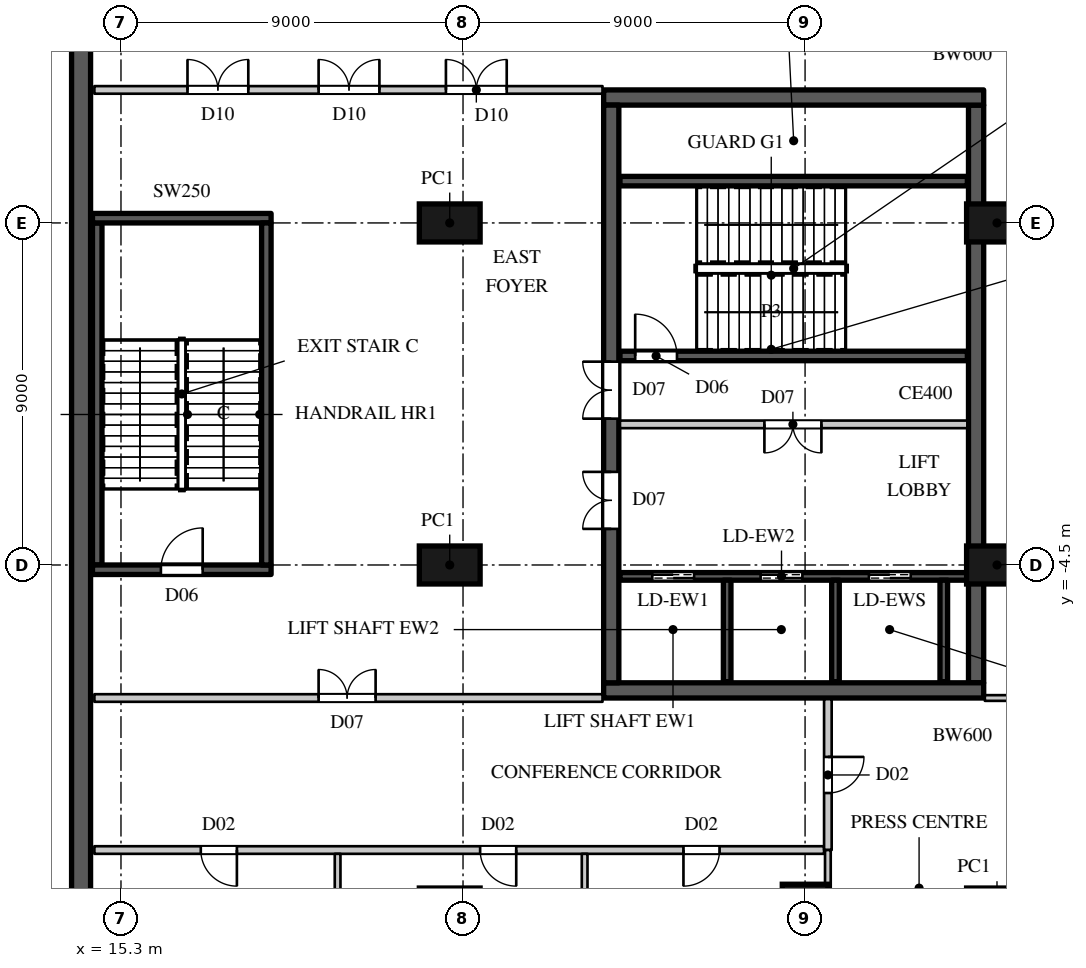
"""IFC4 building model, lengths in metres.
Left out: names, types, materials, properties, quantities, classifications, styles, units other than length and angle.
Written with IfcOpenShell. Run it as: python <this file> out.ifc"""

import sys

from ifc_helpers import new_model, si_unit, direction, frame, frame_2d, origin, origin_2d, place, context, subcontext, project, spatial, rectangle, circle, extrude, element, fill, save


model = new_model("IFC4")
c1 = context("Model", 3, precision=1e-05, world=origin(), true_north=direction((0.0, 1.0)))
c2 = subcontext(c1, "Body", "Model", "MODEL_VIEW")
j1 = project(units=[si_unit("LENGTHUNIT", "METRE"), si_unit("PLANEANGLEUNIT", "RADIAN")], contexts=[c1])
p1 = place(None, origin())
s1 = spatial("IfcSite", under=j1, at=p1, CompositionType="ELEMENT")
p2 = place(p1, origin())
s2 = spatial("IfcBuilding", under=s1, at=p2, CompositionType="ELEMENT")
p3 = place(p2, frame((0.0, 0.0, 19.0)))
s3 = spatial("IfcBuildingStorey", under=s2, at=p3, CompositionType="ELEMENT", Elevation=19.0)
p4 = place(p3, frame((14.25, -19.5, 0.0), z_axis=(0.0, 0.0, 1.0), x_axis=(0.0, 1.0, 0.0)))
e1 = element("IfcWall", 1, at=p4, inside=s3, PredefinedType="SOLIDWALL", context=c2, shape_type="SweptSolid", body=[
    extrude(rectangle(XDim=39.0, YDim=0.5, at=frame_2d((19.5, 0.0))), origin(), (0.0, 0.0, 1.0), 10.0),
])
for number, where, z_axis, x_axis in (
    (2, (23.95, -4.5, 0.0), (0.0, 0.0, 1.0), (0.0, 1.0, 0.0)),
    (3, (23.95, 4.5, 0.0), (0.0, 0.0, 1.0), (0.0, 1.0, 0.0)),
    (4, (38.35, -4.5, 0.0), (0.0, 0.0, 1.0), (0.0, 1.0, 0.0)),
    (5, (38.35, 4.5, 0.0), (0.0, 0.0, 1.0), (0.0, 1.0, 0.0)),
):
    element("IfcColumn", number, at=place(p3, frame(where, z_axis=z_axis, x_axis=x_axis)), inside=s3, PredefinedType="COLUMN", context=c2, shape_type="SweptSolid", body=[
        extrude(rectangle(XDim=1.0, YDim=1.6, at=origin_2d()), origin(), (0.0, 0.0, 1.0), 10.0),
    ])
p5 = place(p3, frame((33.3, -13.5, 0.0), z_axis=(0.0, 0.0, 1.0), x_axis=(1.0, 0.0, 0.0)))
e6 = element("IfcColumn", 6, at=p5, inside=s3, PredefinedType="COLUMN", context=c2, shape_type="SweptSolid", body=[
    extrude(circle(Radius=0.6, at=origin_2d()), origin(), (0.0, 0.0, 1.0), 10.0),
])
for number, where, z_axis, x_axis in (
    (7, (28.0, 7.8, 0.0), (0.0, 0.0, 1.0), (1.0, 0.0, 0.0)),
    (8, (28.0, -7.8, 0.0), (0.0, 0.0, 1.0), (1.0, 0.0, 0.0)),
):
    element("IfcWall", number, at=place(p3, frame(where, z_axis=z_axis, x_axis=x_axis)), inside=s3, PredefinedType="SHEAR", context=c2, shape_type="SweptSolid", body=[
        extrude(rectangle(XDim=10.0, YDim=0.4, at=frame_2d((5.0, 0.0))), origin(), (0.0, 0.0, 1.0), 10.0),
    ])
p6 = place(p3, frame((37.8, -7.6, 0.0), z_axis=(0.0, 0.0, 1.0), x_axis=(0.0, 1.0, 0.0)))
e9 = element("IfcWall", 9, at=p6, inside=s3, PredefinedType="SHEAR", context=c2, shape_type="SweptSolid", body=[
    extrude(rectangle(XDim=15.2, YDim=0.4, at=frame_2d((7.6, 0.0))), origin(), (0.0, 0.0, 1.0), 10.0),
])
p7 = place(p3, frame((28.2, -7.6, 0.0), z_axis=(0.0, 0.0, 1.0), x_axis=(0.0, 1.0, 0.0)))
e10 = element("IfcWall", 10, at=p7, inside=s3, PredefinedType="SHEAR", context=c2, shape_type="SweptSolid", body=[
    extrude(rectangle(XDim=15.2, YDim=0.4, at=frame_2d((7.6, 0.0))), origin(), (0.0, 0.0, 1.0), 10.0),
])
p8 = place(p7, frame((4.05, 0.0, 0.0)))
e11 = element("IfcOpeningElement", 11, at=p8, cuts=e10, PredefinedType="OPENING", context=c2, shape_type="SweptSolid", body=[
    extrude(rectangle(XDim=1.5, YDim=2.4, at=frame_2d((0.75, 1.2))), frame((0.0, 0.21, 0.0), z_axis=(0.0, -1.0, 0.0), x_axis=(1.0, 0.0, 0.0)), (0.0, 0.0, 1.0), 0.42),
])
p9 = place(p7, frame((6.95, 0.0, 0.0)))
e12 = element("IfcOpeningElement", 12, at=p9, cuts=e10, PredefinedType="OPENING", context=c2, shape_type="SweptSolid", body=[
    extrude(rectangle(XDim=1.5, YDim=2.4, at=frame_2d((0.75, 1.2))), frame((0.0, 0.21, 0.0), z_axis=(0.0, -1.0, 0.0), x_axis=(1.0, 0.0, 0.0)), (0.0, 0.0, 1.0), 0.42),
])
p10 = place(p3, frame((14.6, -12.0, 0.0), z_axis=(0.0, 0.0, 1.0), x_axis=(1.0, 0.0, 0.0)))
e13 = element("IfcWall", 13, at=p10, inside=s3, PredefinedType="PARTITIONING", context=c2, shape_type="SweptSolid", body=[
    extrude(rectangle(XDim=19.2, YDim=0.2, at=frame_2d((9.6, 0.0))), origin(), (0.0, 0.0, 1.0), 9.598),
])
p11 = place(p10, frame((2.8, 0.0, 0.0)))
e14 = element("IfcOpeningElement", 14, at=p11, cuts=e13, PredefinedType="OPENING", context=c2, shape_type="SweptSolid", body=[
    extrude(rectangle(XDim=0.95, YDim=2.2, at=frame_2d((0.475, 1.1))), frame((0.0, 0.11, 0.0), z_axis=(0.0, -1.0, 0.0), x_axis=(1.0, 0.0, 0.0)), (0.0, 0.0, 1.0), 0.22),
])
p12 = place(p10, frame((10.15, 0.0, 0.0)))
e15 = element("IfcOpeningElement", 15, at=p12, cuts=e13, PredefinedType="OPENING", context=c2, shape_type="SweptSolid", body=[
    extrude(rectangle(XDim=0.95, YDim=2.2, at=frame_2d((0.475, 1.1))), frame((0.0, 0.11, 0.0), z_axis=(0.0, -1.0, 0.0), x_axis=(1.0, 0.0, 0.0)), (0.0, 0.0, 1.0), 0.22),
])
p13 = place(p10, frame((15.5, 0.0, 0.0)))
e16 = element("IfcOpeningElement", 16, at=p13, cuts=e13, PredefinedType="OPENING", context=c2, shape_type="SweptSolid", body=[
    extrude(rectangle(XDim=0.95, YDim=2.2, at=frame_2d((0.475, 1.1))), frame((0.0, 0.11, 0.0), z_axis=(0.0, -1.0, 0.0), x_axis=(1.0, 0.0, 0.0)), (0.0, 0.0, 1.0), 0.22),
])
p14 = place(p3, frame((14.6, -8.0, 0.0), z_axis=(0.0, 0.0, 1.0), x_axis=(1.0, 0.0, 0.0)))
e17 = element("IfcWall", 17, at=p14, inside=s3, PredefinedType="PARTITIONING", context=c2, shape_type="SweptSolid", body=[
    extrude(rectangle(XDim=13.37, YDim=0.2, at=frame_2d((6.685, 0.0))), origin(), (0.0, 0.0, 1.0), 9.598),
])
p15 = place(p14, frame((5.9, 0.0, 0.0)))
e18 = element("IfcOpeningElement", 18, at=p15, cuts=e17, PredefinedType="OPENING", context=c2, shape_type="SweptSolid", body=[
    extrude(rectangle(XDim=1.5, YDim=2.4, at=frame_2d((0.75, 1.2))), frame((0.0, 0.11, 0.0), z_axis=(0.0, -1.0, 0.0), x_axis=(1.0, 0.0, 0.0)), (0.0, 0.0, 1.0), 0.22),
])
p16 = place(p3, frame((14.6, 8.0, 0.0), z_axis=(0.0, 0.0, 1.0), x_axis=(1.0, 0.0, 0.0)))
e19 = element("IfcWall", 19, at=p16, inside=s3, PredefinedType="PARTITIONING", context=c2, shape_type="SweptSolid", body=[
    extrude(rectangle(XDim=13.37, YDim=0.2, at=frame_2d((6.685, 0.0))), origin(), (0.0, 0.0, 1.0), 9.598),
])
p17 = place(p16, frame((5.9, 0.0, 0.0)))
e20 = element("IfcOpeningElement", 20, at=p17, cuts=e19, PredefinedType="OPENING", context=c2, shape_type="SweptSolid", body=[
    extrude(rectangle(XDim=1.6, YDim=2.4, at=frame_2d((0.8, 1.2))), frame((0.0, 0.11, 0.0), z_axis=(0.0, -1.0, 0.0), x_axis=(1.0, 0.0, 0.0)), (0.0, 0.0, 1.0), 0.22),
])
p18 = place(p16, frame((2.45, 0.0, 0.0)))
e21 = element("IfcOpeningElement", 21, at=p18, cuts=e19, PredefinedType="OPENING", context=c2, shape_type="SweptSolid", body=[
    extrude(rectangle(XDim=1.6, YDim=2.4, at=frame_2d((0.8, 1.2))), frame((0.0, 0.11, 0.0), z_axis=(0.0, -1.0, 0.0), x_axis=(1.0, 0.0, 0.0)), (0.0, 0.0, 1.0), 0.22),
])
p19 = place(p16, frame((9.25, 0.0, 0.0)))
e22 = element("IfcOpeningElement", 22, at=p19, cuts=e19, PredefinedType="OPENING", context=c2, shape_type="SweptSolid", body=[
    extrude(rectangle(XDim=1.6, YDim=2.4, at=frame_2d((0.8, 1.2))), frame((0.0, 0.11, 0.0), z_axis=(0.0, -1.0, 0.0), x_axis=(1.0, 0.0, 0.0)), (0.0, 0.0, 1.0), 0.22),
])
p20 = place(p3, frame((28.43, -0.8, 0.0), z_axis=(0.0, 0.0, 1.0), x_axis=(1.0, 0.0, 0.0)))
e23 = element("IfcWall", 23, at=p20, inside=s3, PredefinedType="PARTITIONING", context=c2, shape_type="SweptSolid", body=[
    extrude(rectangle(XDim=9.14, YDim=0.2, at=frame_2d((4.57, 0.0))), origin(), (0.0, 0.0, 1.0), 9.598),
])
p21 = place(p20, frame((3.8, 0.0, 0.0)))
e24 = element("IfcOpeningElement", 24, at=p21, cuts=e23, PredefinedType="OPENING", context=c2, shape_type="SweptSolid", body=[
    extrude(rectangle(XDim=1.5, YDim=2.4, at=frame_2d((0.75, 1.2))), frame((0.0, 0.11, 0.0), z_axis=(0.0, -1.0, 0.0), x_axis=(1.0, 0.0, 0.0)), (0.0, 0.0, 1.0), 0.22),
])
p22 = place(p3, frame((33.9, -12.0, 0.0), z_axis=(0.0, 0.0, 1.0), x_axis=(0.0, 1.0, 0.0)))
e25 = element("IfcWall", 25, at=p22, inside=s3, PredefinedType="PARTITIONING", context=c2, shape_type="SweptSolid", body=[
    extrude(rectangle(XDim=3.97, YDim=0.2, at=frame_2d((1.985, 0.0))), origin(), (0.0, 0.0, 1.0), 9.598),
])
p23 = place(p22, frame((1.5, 0.0, 0.0)))
e26 = element("IfcOpeningElement", 26, at=p23, cuts=e25, PredefinedType="OPENING", context=c2, shape_type="SweptSolid", body=[
    extrude(rectangle(XDim=0.95, YDim=2.2, at=frame_2d((0.475, 1.1))), frame((0.0, 0.11, 0.0), z_axis=(0.0, -1.0, 0.0), x_axis=(1.0, 0.0, 0.0)), (0.0, 0.0, 1.0), 0.22),
])
for number, where, z_axis, x_axis in (
    (27, (21.0, -27.125, 0.0), (0.0, 0.0, 1.0), (0.0, 1.0, 0.0)),
    (28, (27.5, -27.125, 0.0), (0.0, 0.0, 1.0), (0.0, 1.0, 0.0)),
):
    element("IfcWall", number, at=place(p3, frame(where, z_axis=z_axis, x_axis=x_axis)), inside=s3, PredefinedType="PARTITIONING", context=c2, shape_type="SweptSolid", body=[
        extrude(rectangle(XDim=15.025, YDim=0.15, at=frame_2d((7.512, 0.0))), origin(), (0.0, 0.0, 1.0), 9.598),
    ])
p24 = place(p3, frame((33.9, -13.24, 0.0), z_axis=(0.0, 0.0, 1.0), x_axis=(0.0, 1.0, 0.0)))
e29 = element("IfcWall", 29, at=p24, inside=s3, PredefinedType="PARTITIONING", context=c2, shape_type="SweptSolid", body=[
    extrude(rectangle(XDim=1.24, YDim=0.15, at=frame_2d((0.62, 0.0))), origin(), (0.0, 0.0, 1.0), 9.598),
])
p25 = place(p3, frame((38.03, -8.0, 0.0), z_axis=(0.0, 0.0, 1.0), x_axis=(1.0, 0.0, 0.0)))
e30 = element("IfcWall", 30, at=p25, inside=s3, PredefinedType="PARTITIONING", context=c2, shape_type="SweptSolid", body=[
    extrude(rectangle(XDim=0.595, YDim=0.15, at=frame_2d((0.297, 0.0))), origin(), (0.0, 0.0, 1.0), 9.598),
])
p26 = place(p3, frame((28.43, -4.8, 0.0), z_axis=(0.0, 0.0, 1.0), x_axis=(1.0, 0.0, 0.0)))
e31 = element("IfcWall", 31, at=p26, inside=s3, PredefinedType="SHEAR", context=c2, shape_type="SweptSolid", body=[
    extrude(rectangle(XDim=9.13, YDim=0.2, at=frame_2d((4.565, 0.0))), origin(), (0.0, 0.0, 1.0), 9.598),
])
p27 = place(p26, frame((0.85, 0.0, 0.0)))
e32 = element("IfcOpeningElement", 32, at=p27, cuts=e31, PredefinedType="OPENING", context=c2, shape_type="SweptSolid", body=[
    extrude(rectangle(XDim=1.1, YDim=2.2, at=frame_2d((0.55, 1.1))), frame((0.0, 0.11, 0.0), z_axis=(0.0, -1.0, 0.0), x_axis=(1.0, 0.0, 0.0)), (0.0, 0.0, 1.0), 0.22),
])
p28 = place(p26, frame((3.7, 0.0, 0.0)))
e33 = element("IfcOpeningElement", 33, at=p28, cuts=e31, PredefinedType="OPENING", context=c2, shape_type="SweptSolid", body=[
    extrude(rectangle(XDim=1.1, YDim=2.2, at=frame_2d((0.55, 1.1))), frame((0.0, 0.11, 0.0), z_axis=(0.0, -1.0, 0.0), x_axis=(1.0, 0.0, 0.0)), (0.0, 0.0, 1.0), 0.22),
])
p29 = place(p26, frame((6.55, 0.0, 0.0)))
e34 = element("IfcOpeningElement", 34, at=p29, cuts=e31, PredefinedType="OPENING", context=c2, shape_type="SweptSolid", body=[
    extrude(rectangle(XDim=1.1, YDim=2.2, at=frame_2d((0.55, 1.1))), frame((0.0, 0.11, 0.0), z_axis=(0.0, -1.0, 0.0), x_axis=(1.0, 0.0, 0.0)), (0.0, 0.0, 1.0), 0.22),
])
for number, where, z_axis, x_axis in (
    (35, (31.25, -7.57, 0.0), (0.0, 0.0, 1.0), (0.0, 1.0, 0.0)),
    (36, (34.1, -7.57, 0.0), (0.0, 0.0, 1.0), (0.0, 1.0, 0.0)),
):
    element("IfcWall", number, at=place(p3, frame(where, z_axis=z_axis, x_axis=x_axis)), inside=s3, PredefinedType="SHEAR", context=c2, shape_type="SweptSolid", body=[
        extrude(rectangle(XDim=2.67, YDim=0.2, at=frame_2d((1.335, 0.0))), origin(), (0.0, 0.0, 1.0), 10.0),
    ])
p30 = place(p3, frame((36.95, -7.57, 0.0), z_axis=(0.0, 0.0, 1.0), x_axis=(0.0, 1.0, 0.0)))
e37 = element("IfcWall", 37, at=p30, inside=s3, PredefinedType="SHEAR", context=c2, shape_type="SweptSolid", body=[
    extrude(rectangle(XDim=2.67, YDim=0.2, at=frame_2d((1.335, 0.0))), origin(), (0.0, 0.0, 1.0), 9.598),
])
p31 = place(p3, frame((14.675, -4.5, 0.0), z_axis=(0.0, 0.0, 1.0), x_axis=(0.0, 1.0, 0.0)))
e38 = element("IfcWall", 38, at=p31, inside=s3, PredefinedType="SHEAR", context=c2, shape_type="SweptSolid", body=[
    extrude(rectangle(XDim=9.0, YDim=0.25, at=frame_2d((4.5, 0.0))), origin(), (0.0, 0.0, 1.0), 9.6),
])
p32 = place(p3, frame((14.55, -4.625, 0.0), z_axis=(0.0, 0.0, 1.0), x_axis=(1.0, 0.0, 0.0)))
e39 = element("IfcWall", 39, at=p32, inside=s3, PredefinedType="SHEAR", context=c2, shape_type="SweptSolid", body=[
    extrude(rectangle(XDim=4.7, YDim=0.25, at=frame_2d((2.35, 0.0))), origin(), (0.0, 0.0, 1.0), 9.6),
])
p33 = place(p32, frame((1.8, 0.0, 0.0)))
e40 = element("IfcOpeningElement", 40, at=p33, cuts=e39, PredefinedType="OPENING", context=c2, shape_type="SweptSolid", body=[
    extrude(rectangle(XDim=1.1, YDim=2.2, at=frame_2d((0.55, 1.1))), frame((0.0, 0.135, 0.0), z_axis=(0.0, -1.0, 0.0), x_axis=(1.0, 0.0, 0.0)), (0.0, 0.0, 1.0), 0.27),
])
p34 = place(p3, frame((14.55, 4.625, 0.0), z_axis=(0.0, 0.0, 1.0), x_axis=(1.0, 0.0, 0.0)))
e41 = element("IfcWall", 41, at=p34, inside=s3, PredefinedType="SHEAR", context=c2, shape_type="SweptSolid", body=[
    extrude(rectangle(XDim=4.7, YDim=0.25, at=frame_2d((2.35, 0.0))), origin(), (0.0, 0.0, 1.0), 9.6),
])
p35 = place(p3, frame((19.125, -4.5, 0.0), z_axis=(0.0, 0.0, 1.0), x_axis=(0.0, 1.0, 0.0)))
e42 = element("IfcWall", 42, at=p35, inside=s3, PredefinedType="SHEAR", context=c2, shape_type="SweptSolid", body=[
    extrude(rectangle(XDim=9.0, YDim=0.25, at=frame_2d((4.5, 0.0))), origin(), (0.0, 0.0, 1.0), 9.6),
])
p36 = place(p3, frame((28.43, 1.0, 0.0), z_axis=(0.0, 0.0, 1.0), x_axis=(1.0, 0.0, 0.0)))
e43 = element("IfcWall", 43, at=p36, inside=s3, PredefinedType="SHEAR", context=c2, shape_type="SweptSolid", body=[
    extrude(rectangle(XDim=9.14, YDim=0.25, at=frame_2d((4.57, 0.0))), origin(), (0.0, 0.0, 1.0), 9.598),
])
p37 = place(p36, frame((0.4, 0.0, 0.0)))
e44 = element("IfcOpeningElement", 44, at=p37, cuts=e43, PredefinedType="OPENING", context=c2, shape_type="SweptSolid", body=[
    extrude(rectangle(XDim=1.1, YDim=2.2, at=frame_2d((0.55, 1.1))), frame((0.0, 0.135, 0.0), z_axis=(0.0, -1.0, 0.0), x_axis=(1.0, 0.0, 0.0)), (0.0, 0.0, 1.0), 0.27),
])
p38 = place(p3, frame((28.43, 5.6, 0.0), z_axis=(0.0, 0.0, 1.0), x_axis=(1.0, 0.0, 0.0)))
e45 = element("IfcWall", 45, at=p38, inside=s3, PredefinedType="SHEAR", context=c2, shape_type="SweptSolid", body=[
    extrude(rectangle(XDim=9.14, YDim=0.25, at=frame_2d((4.57, 0.0))), origin(), (0.0, 0.0, 1.0), 9.598),
])
p39 = place(p37, origin())
e46 = element("IfcDoor", 46, at=p39, inside=s3, OperationType="SINGLE_SWING_LEFT", PredefinedType="DOOR", context=c2, shape_type="SweptSolid", body=[
    extrude(rectangle(XDim=1.1, YDim=2.2, at=frame_2d((0.55, 1.1))), frame((0.0, 0.025, 0.0), z_axis=(0.0, -1.0, 0.0), x_axis=(1.0, 0.0, 0.0)), (0.0, 0.0, 1.0), 0.05),
])
fill(e44, e46)
p40 = place(p21, origin())
e47 = element("IfcDoor", 47, at=p40, inside=s3, OperationType="DOUBLE_DOOR_SINGLE_SWING", PredefinedType="DOOR", context=c2, shape_type="SweptSolid", body=[
    extrude(rectangle(XDim=1.5, YDim=2.4, at=frame_2d((0.75, 1.2))), frame((0.0, 0.025, 0.0), z_axis=(0.0, -1.0, 0.0), x_axis=(1.0, 0.0, 0.0)), (0.0, 0.0, 1.0), 0.05),
])
fill(e24, e47)
p41 = place(p27, origin())
e48 = element("IfcDoor", 48, at=p41, inside=s3, OperationType="DOUBLE_DOOR_SLIDING", PredefinedType="DOOR", context=c2, shape_type="SweptSolid", body=[
    extrude(rectangle(XDim=1.1, YDim=2.2, at=frame_2d((0.55, 1.1))), frame((0.0, 0.025, 0.0), z_axis=(0.0, -1.0, 0.0), x_axis=(1.0, 0.0, 0.0)), (0.0, 0.0, 1.0), 0.05),
])
fill(e32, e48)
p42 = place(p28, origin())
e49 = element("IfcDoor", 49, at=p42, inside=s3, OperationType="DOUBLE_DOOR_SLIDING", PredefinedType="DOOR", context=c2, shape_type="SweptSolid", body=[
    extrude(rectangle(XDim=1.1, YDim=2.2, at=frame_2d((0.55, 1.1))), frame((0.0, 0.025, 0.0), z_axis=(0.0, -1.0, 0.0), x_axis=(1.0, 0.0, 0.0)), (0.0, 0.0, 1.0), 0.05),
])
fill(e33, e49)
p43 = place(p29, origin())
e50 = element("IfcDoor", 50, at=p43, inside=s3, OperationType="DOUBLE_DOOR_SLIDING", PredefinedType="DOOR", context=c2, shape_type="SweptSolid", body=[
    extrude(rectangle(XDim=1.1, YDim=2.2, at=frame_2d((0.55, 1.1))), frame((0.0, 0.025, 0.0), z_axis=(0.0, -1.0, 0.0), x_axis=(1.0, 0.0, 0.0)), (0.0, 0.0, 1.0), 0.05),
])
fill(e34, e50)
p44 = place(p17, origin())
e51 = element("IfcDoor", 51, at=p44, inside=s3, OperationType="DOUBLE_DOOR_SINGLE_SWING", PredefinedType="DOOR", context=c2, shape_type="SweptSolid", body=[
    extrude(rectangle(XDim=1.6, YDim=2.4, at=frame_2d((0.8, 1.2))), frame((0.0, 0.025, 0.0), z_axis=(0.0, -1.0, 0.0), x_axis=(1.0, 0.0, 0.0)), (0.0, 0.0, 1.0), 0.05),
])
fill(e20, e51)
p45 = place(p18, origin())
e52 = element("IfcDoor", 52, at=p45, inside=s3, OperationType="DOUBLE_DOOR_SINGLE_SWING", PredefinedType="DOOR", context=c2, shape_type="SweptSolid", body=[
    extrude(rectangle(XDim=1.6, YDim=2.4, at=frame_2d((0.8, 1.2))), frame((0.0, 0.025, 0.0), z_axis=(0.0, -1.0, 0.0), x_axis=(1.0, 0.0, 0.0)), (0.0, 0.0, 1.0), 0.05),
])
fill(e21, e52)
p46 = place(p19, origin())
e53 = element("IfcDoor", 53, at=p46, inside=s3, OperationType="DOUBLE_DOOR_SINGLE_SWING", PredefinedType="DOOR", context=c2, shape_type="SweptSolid", body=[
    extrude(rectangle(XDim=1.6, YDim=2.4, at=frame_2d((0.8, 1.2))), frame((0.0, 0.025, 0.0), z_axis=(0.0, -1.0, 0.0), x_axis=(1.0, 0.0, 0.0)), (0.0, 0.0, 1.0), 0.05),
])
fill(e22, e53)
p47 = place(p15, origin())
e54 = element("IfcDoor", 54, at=p47, inside=s3, OperationType="DOUBLE_DOOR_SINGLE_SWING", PredefinedType="DOOR", context=c2, shape_type="SweptSolid", body=[
    extrude(rectangle(XDim=1.5, YDim=2.4, at=frame_2d((0.75, 1.2))), frame((0.0, 0.025, 0.0), z_axis=(0.0, -1.0, 0.0), x_axis=(1.0, 0.0, 0.0)), (0.0, 0.0, 1.0), 0.05),
])
fill(e18, e54)
p48 = place(p11, origin())
e55 = element("IfcDoor", 55, at=p48, inside=s3, OperationType="SINGLE_SWING_LEFT", PredefinedType="DOOR", context=c2, shape_type="SweptSolid", body=[
    extrude(rectangle(XDim=0.95, YDim=2.2, at=frame_2d((0.475, 1.1))), frame((0.0, 0.025, 0.0), z_axis=(0.0, -1.0, 0.0), x_axis=(1.0, 0.0, 0.0)), (0.0, 0.0, 1.0), 0.05),
])
fill(e14, e55)
p49 = place(p12, origin())
e56 = element("IfcDoor", 56, at=p49, inside=s3, OperationType="SINGLE_SWING_LEFT", PredefinedType="DOOR", context=c2, shape_type="SweptSolid", body=[
    extrude(rectangle(XDim=0.95, YDim=2.2, at=frame_2d((0.475, 1.1))), frame((0.0, 0.025, 0.0), z_axis=(0.0, -1.0, 0.0), x_axis=(1.0, 0.0, 0.0)), (0.0, 0.0, 1.0), 0.05),
])
fill(e15, e56)
p50 = place(p13, origin())
e57 = element("IfcDoor", 57, at=p50, inside=s3, OperationType="SINGLE_SWING_RIGHT", PredefinedType="DOOR", context=c2, shape_type="SweptSolid", body=[
    extrude(rectangle(XDim=0.95, YDim=2.2, at=frame_2d((0.475, 1.1))), frame((0.0, 0.025, 0.0), z_axis=(0.0, -1.0, 0.0), x_axis=(1.0, 0.0, 0.0)), (0.0, 0.0, 1.0), 0.05),
])
fill(e16, e57)
p51 = place(p23, origin())
e58 = element("IfcDoor", 58, at=p51, inside=s3, OperationType="SINGLE_SWING_LEFT", PredefinedType="DOOR", context=c2, shape_type="SweptSolid", body=[
    extrude(rectangle(XDim=0.95, YDim=2.2, at=frame_2d((0.475, 1.1))), frame((0.0, 0.025, 0.0), z_axis=(0.0, -1.0, 0.0), x_axis=(1.0, 0.0, 0.0)), (0.0, 0.0, 1.0), 0.05),
])
fill(e26, e58)
p52 = place(p8, origin())
e59 = element("IfcDoor", 59, at=p52, inside=s3, OperationType="DOUBLE_DOOR_SINGLE_SWING", PredefinedType="DOOR", context=c2, shape_type="SweptSolid", body=[
    extrude(rectangle(XDim=1.5, YDim=2.4, at=frame_2d((0.75, 1.2))), frame((0.0, 0.025, 0.0), z_axis=(0.0, -1.0, 0.0), x_axis=(1.0, 0.0, 0.0)), (0.0, 0.0, 1.0), 0.05),
])
fill(e11, e59)
p53 = place(p9, origin())
e60 = element("IfcDoor", 60, at=p53, inside=s3, OperationType="DOUBLE_DOOR_SINGLE_SWING", PredefinedType="DOOR", context=c2, shape_type="SweptSolid", body=[
    extrude(rectangle(XDim=1.5, YDim=2.4, at=frame_2d((0.75, 1.2))), frame((0.0, 0.025, 0.0), z_axis=(0.0, -1.0, 0.0), x_axis=(1.0, 0.0, 0.0)), (0.0, 0.0, 1.0), 0.05),
])
fill(e12, e60)
p54 = place(p33, origin())
e61 = element("IfcDoor", 61, at=p54, inside=s3, OperationType="SINGLE_SWING_RIGHT", PredefinedType="DOOR", context=c2, shape_type="SweptSolid", body=[
    extrude(rectangle(XDim=1.1, YDim=2.2, at=frame_2d((0.55, 1.1))), frame((0.0, 0.025, 0.0), z_axis=(0.0, -1.0, 0.0), x_axis=(1.0, 0.0, 0.0)), (0.0, 0.0, 1.0), 0.05),
])
fill(e40, e61)
save(model, sys.argv[1])
